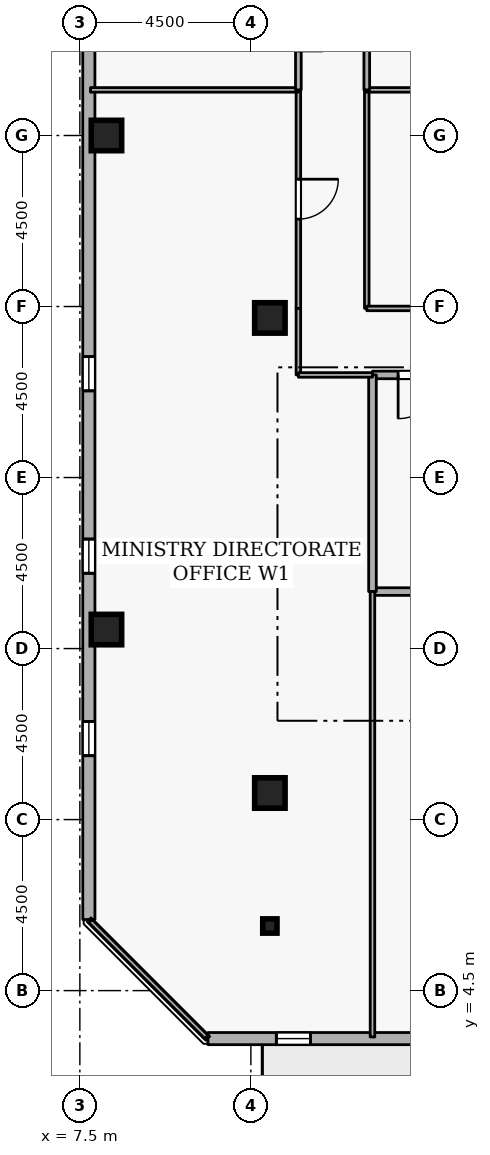
"""IFC4 building model, lengths in metres.
Left out: names, types, materials, properties, quantities, classifications, styles, units other than length and angle.
Written with IfcOpenShell. Run it as: python <this file> out.ifc"""

import sys

from ifc_helpers import new_model, si_unit, direction, frame, frame_2d, origin, origin_2d, place, context, subcontext, project, spatial, rectangle, i_section, extrude, element, fill, save


model = new_model("IFC4")
c1 = context("Model", 3, precision=1e-05, world=origin(), true_north=direction((0.0, 1.0)))
c2 = subcontext(c1, "Body", "Model", "MODEL_VIEW")
j1 = project(units=[si_unit("LENGTHUNIT", "METRE"), si_unit("PLANEANGLEUNIT", "RADIAN")], contexts=[c1])
p1 = place(None, origin())
s1 = spatial("IfcSite", under=j1, at=p1, CompositionType="ELEMENT")
p2 = place(p1, origin())
s2 = spatial("IfcBuilding", under=s1, at=p2, CompositionType="ELEMENT")
p3 = place(p2, frame((0.0, 0.0, 269.1)))
s3 = spatial("IfcBuildingStorey", under=s2, at=p3, CompositionType="ELEMENT", Elevation=269.1)
for number, where, z_axis, x_axis in (
    (1, (12.5, 9.7, 0.0), (0.0, 0.0, 1.0), (1.0, 0.0, 0.0)),
    (2, (8.2, 14.0, 0.0), (0.0, 0.0, 1.0), (1.0, 0.0, 0.0)),
    (3, (8.2, 27.0, 0.0), (0.0, 0.0, 1.0), (1.0, 0.0, 0.0)),
    (4, (12.5, 22.2, 0.0), (0.0, 0.0, 1.0), (1.0, 0.0, 0.0)),
):
    element("IfcColumn", number, at=place(p3, frame(where, z_axis=z_axis, x_axis=x_axis)), inside=s3, PredefinedType="COLUMN", context=c2, shape_type="SweptSolid", body=[
        extrude(rectangle(XDim=0.8, YDim=0.8, at=origin_2d()), origin(), (0.0, 0.0, 1.0), 3.6),
    ])
p4 = place(p3, frame((12.5, 6.2, 0.0), z_axis=(0.0, 0.0, 1.0), x_axis=(1.0, 0.0, 0.0)))
e5 = element("IfcColumn", 5, at=p4, inside=s3, PredefinedType="COLUMN", context=c2, shape_type="SweptSolid", body=[
    extrude(i_section(OverallWidth=0.375, OverallDepth=0.375, WebThickness=0.017, FlangeThickness=0.027, FilletRadius=0.015, at=origin_2d()), origin(), (0.0, 0.0, 1.0), 3.6),
])
p5 = place(p3, frame((10.871, 3.237, 0.0), z_axis=(0.0, 0.0, 1.0), x_axis=(0.999999998513, -5.4540124e-05, 0.0)))
e6 = element("IfcWall", 6, at=p5, inside=s3, PredefinedType="STANDARD", context=c2, shape_type="SweptSolid", body=[
    extrude(rectangle(XDim=35.811, YDim=0.32, at=frame_2d((17.905, 0.0))), origin(), (0.0, 0.0, 1.0), 2.7),
])
p6 = place(p5, frame((22.855, 0.0, 0.0)))
e7 = element("IfcOpeningElement", 7, at=p6, cuts=e6, PredefinedType="OPENING", context=c2, shape_type="SweptSolid", body=[
    extrude(rectangle(XDim=1.0, YDim=2.08, at=frame_2d((0.5, 1.04))), frame((0.0, 0.17, 0.0), z_axis=(0.0, -1.0, 0.0), x_axis=(1.0, 0.0, 0.0)), (0.0, 0.0, 1.0), 0.34),
])
p7 = place(p5, frame((1.8, 0.0, 0.72)))
e8 = element("IfcOpeningElement", 8, at=p7, cuts=e6, PredefinedType="OPENING", context=c2, shape_type="SweptSolid", body=[
    extrude(rectangle(XDim=0.9, YDim=1.75, at=frame_2d((0.45, 0.875))), frame((0.0, 0.17, 0.0), z_axis=(0.0, -1.0, 0.0), x_axis=(1.0, 0.0, 0.0)), (0.0, 0.0, 1.0), 0.34),
])
p8 = place(p5, frame((6.6, 0.0, 0.72)))
e9 = element("IfcOpeningElement", 9, at=p8, cuts=e6, PredefinedType="OPENING", context=c2, shape_type="SweptSolid", body=[
    extrude(rectangle(XDim=0.9, YDim=1.75, at=frame_2d((0.45, 0.875))), frame((0.0, 0.17, 0.0), z_axis=(0.0, -1.0, 0.0), x_axis=(1.0, 0.0, 0.0)), (0.0, 0.0, 1.0), 0.34),
])
p9 = place(p5, frame((11.4, 0.0, 0.72)))
e10 = element("IfcOpeningElement", 10, at=p9, cuts=e6, PredefinedType="OPENING", context=c2, shape_type="SweptSolid", body=[
    extrude(rectangle(XDim=0.9, YDim=1.75, at=frame_2d((0.45, 0.875))), frame((0.0, 0.17, 0.0), z_axis=(0.0, -1.0, 0.0), x_axis=(1.0, 0.0, 0.0)), (0.0, 0.0, 1.0), 0.34),
])
p10 = place(p5, frame((16.2, 0.0, 0.72)))
e11 = element("IfcOpeningElement", 11, at=p10, cuts=e6, PredefinedType="OPENING", context=c2, shape_type="SweptSolid", body=[
    extrude(rectangle(XDim=0.9, YDim=1.75, at=frame_2d((0.45, 0.875))), frame((0.0, 0.17, 0.0), z_axis=(0.0, -1.0, 0.0), x_axis=(1.0, 0.0, 0.0)), (0.0, 0.0, 1.0), 0.34),
])
p11 = place(p5, frame((21.0, 0.0, 0.72)))
e12 = element("IfcOpeningElement", 12, at=p11, cuts=e6, PredefinedType="OPENING", context=c2, shape_type="SweptSolid", body=[
    extrude(rectangle(XDim=0.9, YDim=1.75, at=frame_2d((0.45, 0.875))), frame((0.0, 0.17, 0.0), z_axis=(0.0, -1.0, 0.0), x_axis=(1.0, 0.0, 0.0)), (0.0, 0.0, 1.0), 0.34),
])
p12 = place(p5, frame((25.8, 0.0, 0.72)))
e13 = element("IfcOpeningElement", 13, at=p12, cuts=e6, PredefinedType="OPENING", context=c2, shape_type="SweptSolid", body=[
    extrude(rectangle(XDim=0.9, YDim=1.75, at=frame_2d((0.45, 0.875))), frame((0.0, 0.17, 0.0), z_axis=(0.0, -1.0, 0.0), x_axis=(1.0, 0.0, 0.0)), (0.0, 0.0, 1.0), 0.34),
])
p13 = place(p5, frame((30.6, 0.0, 0.72)))
e14 = element("IfcOpeningElement", 14, at=p13, cuts=e6, PredefinedType="OPENING", context=c2, shape_type="SweptSolid", body=[
    extrude(rectangle(XDim=0.9, YDim=1.75, at=frame_2d((0.45, 0.875))), frame((0.0, 0.17, 0.0), z_axis=(0.0, -1.0, 0.0), x_axis=(1.0, 0.0, 0.0)), (0.0, 0.0, 1.0), 0.34),
])
p14 = place(p3, frame((7.735, 42.181, 0.0), z_axis=(0.0, 0.0, 1.0), x_axis=(5.4540124e-05, -0.999999998513, 0.0)))
e15 = element("IfcWall", 15, at=p14, inside=s3, PredefinedType="STANDARD", context=c2, shape_type="SweptSolid", body=[
    extrude(rectangle(XDim=35.811, YDim=0.32, at=frame_2d((17.905, 0.0))), origin(), (0.0, 0.0, 1.0), 2.7),
])
p15 = place(p14, frame((6.6, 0.0, 0.72)))
e16 = element("IfcOpeningElement", 16, at=p15, cuts=e15, PredefinedType="OPENING", context=c2, shape_type="SweptSolid", body=[
    extrude(rectangle(XDim=0.9, YDim=1.75, at=frame_2d((0.45, 0.875))), frame((0.0, 0.17, 0.0), z_axis=(0.0, -1.0, 0.0), x_axis=(1.0, 0.0, 0.0)), (0.0, 0.0, 1.0), 0.34),
])
p16 = place(p14, frame((11.4, 0.0, 0.72)))
e17 = element("IfcOpeningElement", 17, at=p16, cuts=e15, PredefinedType="OPENING", context=c2, shape_type="SweptSolid", body=[
    extrude(rectangle(XDim=0.9, YDim=1.75, at=frame_2d((0.45, 0.875))), frame((0.0, 0.17, 0.0), z_axis=(0.0, -1.0, 0.0), x_axis=(1.0, 0.0, 0.0)), (0.0, 0.0, 1.0), 0.34),
])
p17 = place(p14, frame((21.0, 0.0, 0.72)))
e18 = element("IfcOpeningElement", 18, at=p17, cuts=e15, PredefinedType="OPENING", context=c2, shape_type="SweptSolid", body=[
    extrude(rectangle(XDim=0.9, YDim=1.75, at=frame_2d((0.45, 0.875))), frame((0.0, 0.17, 0.0), z_axis=(0.0, -1.0, 0.0), x_axis=(1.0, 0.0, 0.0)), (0.0, 0.0, 1.0), 0.34),
])
p18 = place(p14, frame((25.8, 0.0, 0.72)))
e19 = element("IfcOpeningElement", 19, at=p18, cuts=e15, PredefinedType="OPENING", context=c2, shape_type="SweptSolid", body=[
    extrude(rectangle(XDim=0.9, YDim=1.75, at=frame_2d((0.45, 0.875))), frame((0.0, 0.17, 0.0), z_axis=(0.0, -1.0, 0.0), x_axis=(1.0, 0.0, 0.0)), (0.0, 0.0, 1.0), 0.34),
])
p19 = place(p14, frame((30.6, 0.0, 0.72)))
e20 = element("IfcOpeningElement", 20, at=p19, cuts=e15, PredefinedType="OPENING", context=c2, shape_type="SweptSolid", body=[
    extrude(rectangle(XDim=0.9, YDim=1.75, at=frame_2d((0.45, 0.875))), frame((0.0, 0.17, 0.0), z_axis=(0.0, -1.0, 0.0), x_axis=(1.0, 0.0, 0.0)), (0.0, 0.0, 1.0), 0.34),
])
p20 = place(p3, frame((15.2, 15.0, 0.0), z_axis=(0.0, 0.0, 1.0), x_axis=(1.0, 0.0, 0.0)))
e21 = element("IfcWall", 21, at=p20, inside=s3, PredefinedType="STANDARD", context=c2, shape_type="SweptSolid", body=[
    extrude(rectangle(XDim=2.5, YDim=0.2, at=frame_2d((1.25, 0.0))), origin(), (0.0, 0.0, 1.0), 3.34),
])
p21 = place(p3, frame((17.7, 20.7, 0.0), z_axis=(0.0, 0.0, 1.0), x_axis=(-1.0, 0.0, 0.0)))
e22 = element("IfcWall", 22, at=p21, inside=s3, PredefinedType="STANDARD", context=c2, shape_type="SweptSolid", body=[
    extrude(rectangle(XDim=2.5, YDim=0.2, at=frame_2d((1.25, 0.0))), origin(), (0.0, 0.0, 1.0), 3.34),
])
p22 = place(p21, frame((0.675, 0.0, 0.0)))
e23 = element("IfcOpeningElement", 23, at=p22, cuts=e22, PredefinedType="OPENING", context=c2, shape_type="SweptSolid", body=[
    extrude(rectangle(XDim=1.15, YDim=2.1, at=frame_2d((0.575, 1.05))), frame((0.0, 0.11, 0.0), z_axis=(0.0, -1.0, 0.0), x_axis=(1.0, 0.0, 0.0)), (0.0, 0.0, 1.0), 0.22),
])
p23 = place(p3, frame((15.2, 20.7, 0.0), z_axis=(0.0, 0.0, 1.0), x_axis=(0.0, -1.0, 0.0)))
e24 = element("IfcWall", 24, at=p23, inside=s3, PredefinedType="STANDARD", context=c2, shape_type="SweptSolid", body=[
    extrude(rectangle(XDim=5.7, YDim=0.2, at=frame_2d((2.85, 0.0))), origin(), (0.0, 0.0, 1.0), 3.34),
])
p24 = place(p3, frame((13.25, 28.2, 0.0), z_axis=(0.0, 0.0, 1.0), x_axis=(0.0, -1.0, 0.0)))
e25 = element("IfcWall", 25, at=p24, inside=s3, PredefinedType="PARTITIONING", context=c2, shape_type="SweptSolid", body=[
    extrude(rectangle(XDim=5.75, YDim=0.12, at=frame_2d((2.875, 0.0))), origin(), (0.0, 0.0, 1.0), 3.34),
])
p25 = place(p24, frame((2.35, 0.0, 0.0)))
e26 = element("IfcOpeningElement", 26, at=p25, cuts=e25, PredefinedType="OPENING", context=c2, shape_type="SweptSolid", body=[
    extrude(rectangle(XDim=1.05, YDim=2.1, at=frame_2d((0.525, 1.05))), frame((0.0, 0.07, 0.0), z_axis=(0.0, -1.0, 0.0), x_axis=(1.0, 0.0, 0.0)), (0.0, 0.0, 1.0), 0.14),
])
p26 = place(p3, frame((13.25, 22.45, 0.0), z_axis=(0.0, 0.0, 1.0), x_axis=(0.0, -1.0, 0.0)))
e27 = element("IfcWall", 27, at=p26, inside=s3, PredefinedType="PARTITIONING", context=c2, shape_type="SweptSolid", body=[
    extrude(rectangle(XDim=1.75, YDim=0.12, at=frame_2d((0.875, 0.0))), origin(), (0.0, 0.0, 1.0), 3.34),
])
p27 = place(p3, frame((13.25, 20.7, 0.0), z_axis=(0.0, 0.0, 1.0), x_axis=(1.0, 0.0, 0.0)))
e28 = element("IfcWall", 28, at=p27, inside=s3, PredefinedType="PARTITIONING", context=c2, shape_type="SweptSolid", body=[
    extrude(rectangle(XDim=1.95, YDim=0.12, at=frame_2d((0.975, 0.0))), origin(), (0.0, 0.0, 1.0), 3.34),
])
p28 = place(p3, frame((15.2, 15.0, 0.0), z_axis=(0.0, 0.0, 1.0), x_axis=(0.0, -1.0, 0.0)))
e29 = element("IfcWall", 29, at=p28, inside=s3, PredefinedType="PARTITIONING", context=c2, shape_type="SweptSolid", body=[
    extrude(rectangle(XDim=11.72, YDim=0.12, at=frame_2d((5.86, 0.0))), origin(), (0.0, 0.0, 1.0), 3.34),
])
p29 = place(p3, frame((10.829, 3.28, 0.0), z_axis=(0.0, 0.0, 1.0), x_axis=(-0.707106781187, 0.707106781187, 0.0)))
e30 = element("IfcWall", 30, at=p29, inside=s3, PredefinedType="PARTITIONING", context=c2, shape_type="SweptSolid", body=[
    extrude(rectangle(XDim=4.311, YDim=0.12, at=frame_2d((2.156, 0.0))), origin(), (0.0, 0.0, 1.0), 3.34),
])
p30 = place(p3, frame((7.78, 28.2, 0.0), z_axis=(0.0, 0.0, 1.0), x_axis=(1.0, 0.0, 0.0)))
e31 = element("IfcWall", 31, at=p30, inside=s3, PredefinedType="PARTITIONING", context=c2, shape_type="SweptSolid", body=[
    extrude(rectangle(XDim=5.47, YDim=0.12, at=frame_2d((2.735, 0.0))), origin(), (0.0, 0.0, 1.0), 3.34),
])
p31 = place(p3, frame((13.25, 31.55, 0.0), z_axis=(0.0, 0.0, 1.0), x_axis=(0.0, -1.0, 0.0)))
e32 = element("IfcWall", 32, at=p31, inside=s3, PredefinedType="PARTITIONING", context=c2, shape_type="SweptSolid", body=[
    extrude(rectangle(XDim=3.35, YDim=0.15, at=frame_2d((1.675, 0.0))), origin(), (0.0, 0.0, 1.0), 3.34),
])
p32 = place(p31, frame((1.025, 0.0, 0.0)))
e33 = element("IfcOpeningElement", 33, at=p32, cuts=e32, PredefinedType="OPENING", context=c2, shape_type="SweptSolid", body=[
    extrude(rectangle(XDim=1.3, YDim=2.12, at=frame_2d((0.65, 1.06))), frame((0.0, 0.085, 0.0), z_axis=(0.0, -1.0, 0.0), x_axis=(1.0, 0.0, 0.0)), (0.0, 0.0, 1.0), 0.17),
])
p33 = place(p3, frame((15.05, 22.45, 0.0), z_axis=(0.0, 0.0, 1.0), x_axis=(0.0, 1.0, 0.0)))
e34 = element("IfcWall", 34, at=p33, inside=s3, PredefinedType="PARTITIONING", context=c2, shape_type="SweptSolid", body=[
    extrude(rectangle(XDim=5.75, YDim=0.12, at=frame_2d((2.875, 0.0))), origin(), (0.0, 0.0, 1.0), 3.34),
])
p34 = place(p3, frame((15.05, 28.2, 0.0), z_axis=(0.0, 0.0, 1.0), x_axis=(1.0, 0.0, 0.0)))
e35 = element("IfcWall", 35, at=p34, inside=s3, PredefinedType="PARTITIONING", context=c2, shape_type="SweptSolid", body=[
    extrude(rectangle(XDim=5.85, YDim=0.12, at=frame_2d((2.925, 0.0))), origin(), (0.0, 0.0, 1.0), 3.34),
])
p35 = place(p3, frame((20.9, 22.45, 0.0), z_axis=(0.0, 0.0, 1.0), x_axis=(-1.0, 0.0, 0.0)))
e36 = element("IfcWall", 36, at=p35, inside=s3, PredefinedType="PARTITIONING", context=c2, shape_type="SweptSolid", body=[
    extrude(rectangle(XDim=5.85, YDim=0.12, at=frame_2d((2.925, 0.0))), origin(), (0.0, 0.0, 1.0), 3.34),
])
p36 = place(p35, frame((2.45, 0.0, 0.0)))
e37 = element("IfcOpeningElement", 37, at=p36, cuts=e36, PredefinedType="OPENING", context=c2, shape_type="SweptSolid", body=[
    extrude(rectangle(XDim=0.95, YDim=2.1, at=frame_2d((0.475, 1.05))), frame((0.0, 0.07, 0.0), z_axis=(0.0, -1.0, 0.0), x_axis=(1.0, 0.0, 0.0)), (0.0, 0.0, 1.0), 0.14),
])
p37 = place(p3, frame((15.05, 28.2, 0.0), z_axis=(0.0, 0.0, 1.0), x_axis=(0.0, 1.0, 0.0)))
e38 = element("IfcWall", 38, at=p37, inside=s3, PredefinedType="PARTITIONING", context=c2, shape_type="SweptSolid", body=[
    extrude(rectangle(XDim=3.35, YDim=0.15, at=frame_2d((1.675, 0.0))), origin(), (0.0, 0.0, 1.0), 3.34),
])
p38 = place(p7, origin())
e39 = element("IfcWindow", 39, at=p38, inside=s3, PartitioningType="SINGLE_PANEL", PredefinedType="WINDOW", context=c2, shape_type="SweptSolid", body=[
    extrude(rectangle(XDim=0.9, YDim=1.75, at=frame_2d((0.45, 0.875))), frame((0.0, 0.03, 0.0), z_axis=(0.0, -1.0, 0.0), x_axis=(1.0, 0.0, 0.0)), (0.0, 0.0, 1.0), 0.06),
])
fill(e8, e39)
p39 = place(p17, origin())
e40 = element("IfcWindow", 40, at=p39, inside=s3, PartitioningType="SINGLE_PANEL", PredefinedType="WINDOW", context=c2, shape_type="SweptSolid", body=[
    extrude(rectangle(XDim=0.9, YDim=1.75, at=frame_2d((0.45, 0.875))), frame((0.0, 0.03, 0.0), z_axis=(0.0, -1.0, 0.0), x_axis=(1.0, 0.0, 0.0)), (0.0, 0.0, 1.0), 0.06),
])
fill(e18, e40)
p40 = place(p18, origin())
e41 = element("IfcWindow", 41, at=p40, inside=s3, PartitioningType="SINGLE_PANEL", PredefinedType="WINDOW", context=c2, shape_type="SweptSolid", body=[
    extrude(rectangle(XDim=0.9, YDim=1.75, at=frame_2d((0.45, 0.875))), frame((0.0, 0.03, 0.0), z_axis=(0.0, -1.0, 0.0), x_axis=(1.0, 0.0, 0.0)), (0.0, 0.0, 1.0), 0.06),
])
fill(e19, e41)
p41 = place(p19, origin())
e42 = element("IfcWindow", 42, at=p41, inside=s3, PartitioningType="SINGLE_PANEL", PredefinedType="WINDOW", context=c2, shape_type="SweptSolid", body=[
    extrude(rectangle(XDim=0.9, YDim=1.75, at=frame_2d((0.45, 0.875))), frame((0.0, 0.03, 0.0), z_axis=(0.0, -1.0, 0.0), x_axis=(1.0, 0.0, 0.0)), (0.0, 0.0, 1.0), 0.06),
])
fill(e20, e42)
p42 = place(p22, origin())
e43 = element("IfcDoor", 43, at=p42, inside=s3, OperationType="SINGLE_SWING_RIGHT", PredefinedType="DOOR", context=c2, shape_type="SweptSolid", body=[
    extrude(rectangle(XDim=1.15, YDim=2.1, at=frame_2d((0.575, 1.05))), frame((0.0, 0.025, 0.0), z_axis=(0.0, -1.0, 0.0), x_axis=(1.0, 0.0, 0.0)), (0.0, 0.0, 1.0), 0.05),
])
fill(e23, e43)
p43 = place(p25, origin())
e44 = element("IfcDoor", 44, at=p43, inside=s3, OperationType="SINGLE_SWING_LEFT", PredefinedType="DOOR", context=c2, shape_type="SweptSolid", body=[
    extrude(rectangle(XDim=1.05, YDim=2.1, at=frame_2d((0.525, 1.05))), frame((0.0, 0.025, 0.0), z_axis=(0.0, -1.0, 0.0), x_axis=(1.0, 0.0, 0.0)), (0.0, 0.0, 1.0), 0.05),
])
fill(e26, e44)
save(model, sys.argv[1])
